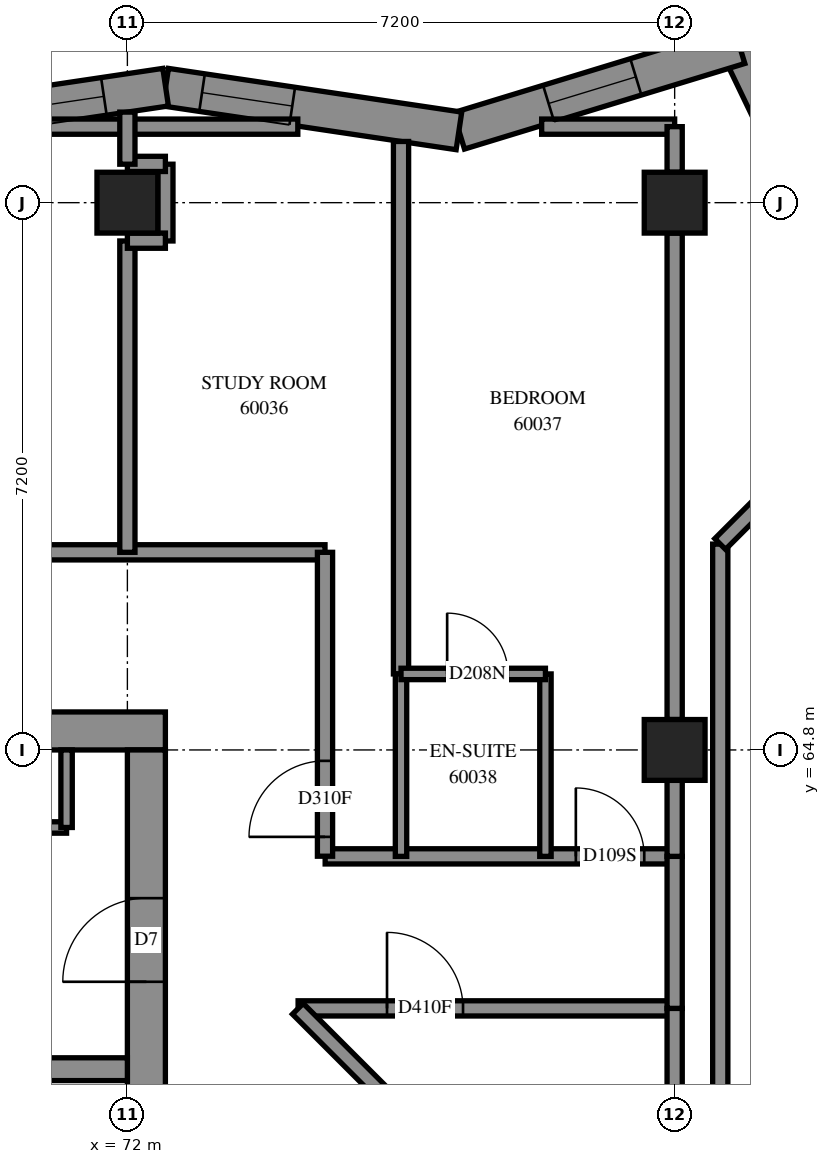
"""IFC4 building model, lengths in metres.
Left out: names, types, materials, properties, quantities, classifications, styles, units other than length and angle.
Written with IfcOpenShell. Run it as: python <this file> out.ifc"""

import sys

from ifc_helpers import new_model, si_unit, direction, frame, frame_2d, origin, origin_2d, place, context, subcontext, project, spatial, polyline, rectangle, outline, extrude, element, fill, save


model = new_model("IFC4")
c1 = context("Model", 3, precision=1e-05, world=origin(), true_north=direction((0.0, 1.0)))
c2 = subcontext(c1, "Body", "Model", "MODEL_VIEW")
j1 = project(units=[si_unit("LENGTHUNIT", "METRE"), si_unit("PLANEANGLEUNIT", "RADIAN")], contexts=[c1])
p1 = place(None, origin())
s1 = spatial("IfcSite", under=j1, at=p1, CompositionType="ELEMENT")
p2 = place(p1, origin())
s2 = spatial("IfcBuilding", under=s1, at=p2, CompositionType="ELEMENT")
p3 = place(p2, frame((0.0, 0.0, 220.2)))
s3 = spatial("IfcBuildingStorey", under=s2, at=p3, CompositionType="ELEMENT", Elevation=220.2)
for number, where, z_axis, x_axis in (
    (1, (72.0, 72.0, 0.0), (0.0, 0.0, 1.0), (1.0, 0.0, 0.0)),
    (2, (79.2, 64.8, 0.0), (0.0, 0.0, 1.0), (1.0, 0.0, 0.0)),
    (3, (79.2, 72.0, 0.0), (0.0, 0.0, 1.0), (1.0, 0.0, 0.0)),
):
    element("IfcColumn", number, at=place(p3, frame(where, z_axis=z_axis, x_axis=x_axis)), inside=s3, PredefinedType="COLUMN", context=c2, shape_type="SweptSolid", body=[
        extrude(rectangle(XDim=0.8, YDim=0.8, at=origin_2d()), origin(), (0.0, 0.0, 1.0), 3.1),
    ])
p4 = place(p3, frame((57.1, 65.05, -0.3), z_axis=(0.0, 0.0, 1.0), x_axis=(1.0, 0.0, 0.0)))
e4 = element("IfcWall", 4, at=p4, inside=s3, PredefinedType="SHEAR", context=c2, shape_type="SweptSolid", body=[
    extrude(rectangle(XDim=15.4, YDim=0.5, at=frame_2d((7.7, 0.0))), origin(), (0.0, 0.0, 1.0), 2.7),
])
p5 = place(p4, frame((10.5, 0.0, 0.3)))
e5 = element("IfcOpeningElement", 5, at=p5, cuts=e4, PredefinedType="OPENING", context=c2, shape_type="SweptSolid", body=[
    extrude(rectangle(XDim=0.8, YDim=2.1, at=frame_2d((0.4, 1.05))), frame((0.0, 0.26, 0.0), z_axis=(0.0, -1.0, 0.0), x_axis=(1.0, 0.0, 0.0)), (0.0, 0.0, 1.0), 0.52),
])
p6 = place(p3, frame((72.25, 50.4, -0.3), z_axis=(0.0, 0.0, 1.0), x_axis=(0.0, 1.0, 0.0)))
e6 = element("IfcWall", 6, at=p6, inside=s3, PredefinedType="SHEAR", context=c2, shape_type="SweptSolid", body=[
    extrude(rectangle(XDim=14.4, YDim=0.5, at=frame_2d((7.2, 0.0))), origin(), (0.0, 0.0, 1.0), 2.7),
])
p7 = place(p6, frame((4.55, 0.0, 0.3)))
e7 = element("IfcOpeningElement", 7, at=p7, cuts=e6, PredefinedType="OPENING", context=c2, shape_type="SweptSolid", body=[
    extrude(rectangle(XDim=1.1, YDim=2.1, at=frame_2d((0.55, 1.05))), frame((0.0, 0.26, 0.0), z_axis=(0.0, -1.0, 0.0), x_axis=(1.0, 0.0, 0.0)), (0.0, 0.0, 1.0), 0.52),
])
p8 = place(p6, frame((11.35, 0.0, 0.3)))
e8 = element("IfcOpeningElement", 8, at=p8, cuts=e6, PredefinedType="OPENING", context=c2, shape_type="SweptSolid", body=[
    extrude(rectangle(XDim=1.1, YDim=2.1, at=frame_2d((0.55, 1.05))), frame((0.0, 0.26, 0.0), z_axis=(0.0, -1.0, 0.0), x_axis=(1.0, 0.0, 0.0)), (0.0, 0.0, 1.0), 0.52),
])
p9 = place(p3, frame((64.8, 60.6, 0.0), z_axis=(0.0, 0.0, 1.0), x_axis=(1.0, 0.0, 0.0)))
e9 = element("IfcWall", 9, at=p9, inside=s3, PredefinedType="SOLIDWALL", context=c2, shape_type="SweptSolid", body=[
    extrude(rectangle(XDim=7.2, YDim=0.3, at=frame_2d((3.6, 0.0))), origin(), (0.0, 0.0, 1.0), 3.1),
])
p10 = place(p3, frame((81.517, 71.016, 0.0), z_axis=(0.0, 0.0, 1.0), x_axis=(-0.4329306404, 0.9014272353, 0.0)))
e10 = element("IfcWall", 10, at=p10, inside=s3, PredefinedType="SOLIDWALL", context=c2, shape_type="SweptSolid", body=[
    extrude(outline(polyline([(0.065, -0.25), (3.603, -0.25), (3.173, 0.25), (-0.065, 0.25), (0.065, -0.25)])), origin(), (0.0, 0.0, 1.0), 3.1),
])
p11 = place(p10, frame((0.737, 0.0, 0.45)))
e11 = element("IfcOpeningElement", 11, at=p11, cuts=e10, PredefinedType="OPENING", context=c2, shape_type="SweptSolid", body=[
    extrude(rectangle(XDim=1.2, YDim=2.5, at=frame_2d((0.6, 1.25))), frame((0.0, 0.26, 0.0), z_axis=(0.0, -1.0, 0.0), x_axis=(1.0, 0.0, 0.0)), (0.0, 0.0, 1.0), 0.52),
])
p12 = place(p3, frame((80.05, 74.07, 0.0), z_axis=(0.0, 0.0, 1.0), x_axis=(-0.9564370844, -0.2919385271, 0.0)))
e12 = element("IfcWall", 12, at=p12, inside=s3, PredefinedType="SOLIDWALL", context=c2, shape_type="SweptSolid", body=[
    extrude(outline(polyline([(-0.215, -0.25), (3.8, -0.25), (3.913, 0.25), (0.215, 0.25), (-0.215, -0.25)])), origin(), (0.0, 0.0, 1.0), 3.1),
])
p13 = place(p12, frame((1.423, 0.0, 0.45)))
e13 = element("IfcOpeningElement", 13, at=p13, cuts=e12, PredefinedType="OPENING", context=c2, shape_type="SweptSolid", body=[
    extrude(rectangle(XDim=1.2, YDim=2.5, at=frame_2d((0.6, 1.25))), frame((0.0, 0.26, 0.0), z_axis=(0.0, -1.0, 0.0), x_axis=(1.0, 0.0, 0.0)), (0.0, 0.0, 1.0), 0.52),
])
p14 = place(p3, frame((76.362, 72.944, 0.0), z_axis=(0.0, 0.0, 1.0), x_axis=(-0.9890858863, 0.1473401149, 0.0)))
e14 = element("IfcWall", 14, at=p14, inside=s3, PredefinedType="SOLIDWALL", context=c2, shape_type="SweptSolid", body=[
    extrude(outline(polyline([(0.056, -0.25), (3.938, -0.25), (3.864, 0.25), (-0.056, 0.25), (0.056, -0.25)])), origin(), (0.0, 0.0, 1.0), 3.1),
])
p15 = place(p14, frame((2.217, 0.0, 0.45)))
e15 = element("IfcOpeningElement", 15, at=p15, cuts=e14, PredefinedType="OPENING", context=c2, shape_type="SweptSolid", body=[
    extrude(rectangle(XDim=1.2, YDim=2.5, at=frame_2d((0.6, 1.25))), frame((0.0, 0.26, 0.0), z_axis=(0.0, -1.0, 0.0), x_axis=(1.0, 0.0, 0.0)), (0.0, 0.0, 1.0), 0.52),
])
p16 = place(p3, frame((72.503, 73.519, 0.0), z_axis=(0.0, 0.0, 1.0), x_axis=(-0.9890847468, -0.1473477641, 0.0)))
e16 = element("IfcWall", 16, at=p16, inside=s3, PredefinedType="SOLIDWALL", context=c2, shape_type="SweptSolid", body=[
    extrude(outline(polyline([(-0.037, -0.25), (3.845, -0.25), (3.919, 0.25), (0.037, 0.25), (-0.037, -0.25)])), origin(), (0.0, 0.0, 1.0), 3.1),
])
p17 = place(p16, frame((2.195, 0.0, 0.45)))
e17 = element("IfcOpeningElement", 17, at=p17, cuts=e16, PredefinedType="OPENING", context=c2, shape_type="SweptSolid", body=[
    extrude(rectangle(XDim=1.3, YDim=2.5, at=frame_2d((0.65, 1.25))), frame((0.0, 0.26, 0.0), z_axis=(0.0, -1.0, 0.0), x_axis=(1.0, 0.0, 0.0)), (0.0, 0.0, 1.0), 0.52),
])
p18 = place(p16, frame((0.822, 0.0, 0.45)))
e18 = element("IfcOpeningElement", 18, at=p18, cuts=e16, PredefinedType="OPENING", context=c2, shape_type="SweptSolid", body=[
    extrude(rectangle(XDim=0.8, YDim=2.5, at=frame_2d((0.4, 1.25))), frame((0.0, 0.26, 0.0), z_axis=(0.0, -1.0, 0.0), x_axis=(1.0, 0.0, 0.0)), (0.0, 0.0, 1.0), 0.52),
])
p19 = place(p3, frame((64.95, 63.78, 0.0), z_axis=(0.0, 0.0, 1.0), x_axis=(1.0, 0.0, 0.0)))
e19 = element("IfcWall", 19, at=p19, inside=s3, PredefinedType="PARTITIONING", context=c2, shape_type="SweptSolid", body=[
    extrude(rectangle(XDim=6.25, YDim=0.15, at=frame_2d((3.125, 0.0))), origin(), (0.0, 0.0, 1.0), 3.1),
])
p20 = place(p3, frame((71.2, 63.78, 0.0), z_axis=(0.0, 0.0, 1.0), x_axis=(0.0, 1.0, 0.0)))
e20 = element("IfcWall", 20, at=p20, inside=s3, PredefinedType="PARTITIONING", context=c2, shape_type="SweptSolid", body=[
    extrude(rectangle(XDim=1.02, YDim=0.15, at=frame_2d((0.51, 0.0))), origin(), (0.0, 0.0, 1.0), 3.1),
])
p21 = place(p3, frame((55.0, 67.4, 0.0), z_axis=(0.0, 0.0, 1.0), x_axis=(1.0, 0.0, 0.0)))
e21 = element("IfcWall", 21, at=p21, inside=s3, PredefinedType="PARTITIONING", context=c2, shape_type="SweptSolid", body=[
    extrude(rectangle(XDim=19.6, YDim=0.2, at=frame_2d((9.8, 0.0))), origin(), (0.0, 0.0, 1.0), 3.1),
])
p22 = place(p21, frame((4.9, 0.0, 0.0)))
e22 = element("IfcOpeningElement", 22, at=p22, cuts=e21, PredefinedType="OPENING", context=c2, shape_type="SweptSolid", body=[
    extrude(rectangle(XDim=0.9, YDim=2.1, at=frame_2d((0.45, 1.05))), frame((0.0, 0.11, 0.0), z_axis=(0.0, -1.0, 0.0), x_axis=(1.0, 0.0, 0.0)), (0.0, 0.0, 1.0), 0.22),
])
p23 = place(p21, frame((6.6, 0.0, 0.0)))
e23 = element("IfcOpeningElement", 23, at=p23, cuts=e21, PredefinedType="OPENING", context=c2, shape_type="SweptSolid", body=[
    extrude(rectangle(XDim=0.9, YDim=2.1, at=frame_2d((0.45, 1.05))), frame((0.0, 0.11, 0.0), z_axis=(0.0, -1.0, 0.0), x_axis=(1.0, 0.0, 0.0)), (0.0, 0.0, 1.0), 0.22),
])
p24 = place(p21, frame((14.001, 0.0, 0.0)))
e24 = element("IfcOpeningElement", 24, at=p24, cuts=e21, PredefinedType="OPENING", context=c2, shape_type="SweptSolid", body=[
    extrude(rectangle(XDim=0.9, YDim=2.1, at=frame_2d((0.45, 1.05))), frame((0.0, 0.11, 0.0), z_axis=(0.0, -1.0, 0.0), x_axis=(1.0, 0.0, 0.0)), (0.0, 0.0, 1.0), 0.22),
])
p25 = place(p3, frame((79.8, 55.912, 0.0), z_axis=(0.0, 0.0, 1.0), x_axis=(0.0, 1.0, 0.0)))
e25 = element("IfcWall", 25, at=p25, inside=s3, PredefinedType="PARTITIONING", context=c2, shape_type="SweptSolid", body=[
    extrude(rectangle(XDim=11.596, YDim=0.2, at=frame_2d((5.798, 0.0))), origin(), (0.0, 0.0, 1.0), 3.1),
])
p26 = place(p3, frame((79.799, 55.913, 0.0), z_axis=(0.0, 0.0, 1.0), x_axis=(0.7071067812, 0.7071067812, 0.0)))
e26 = element("IfcWall", 26, at=p26, inside=s3, PredefinedType="PARTITIONING", context=c2, shape_type="SweptSolid", body=[
    extrude(rectangle(XDim=9.95, YDim=0.2, at=frame_2d((4.975, 0.0))), origin(), (0.0, 0.0, 1.0), 3.1),
])
p27 = place(p26, frame((0.927, 0.0, 0.0)))
e27 = element("IfcOpeningElement", 27, at=p27, cuts=e26, PredefinedType="OPENING", context=c2, shape_type="SweptSolid", body=[
    extrude(rectangle(XDim=1.0, YDim=2.1, at=frame_2d((0.5, 1.05))), frame((0.0, 0.11, 0.0), z_axis=(0.0, -1.0, 0.0), x_axis=(1.0, 0.0, 0.0)), (0.0, 0.0, 1.0), 0.22),
])
p28 = place(p3, frame((75.6, 65.8, 0.0), z_axis=(0.0, 0.0, 1.0), x_axis=(0.0, 1.0, 0.0)))
e28 = element("IfcWall", 28, at=p28, inside=s3, PredefinedType="PARTITIONING", context=c2, shape_type="SweptSolid", body=[
    extrude(rectangle(XDim=7.005, YDim=0.2, at=frame_2d((3.503, 0.0))), origin(), (0.0, 0.0, 1.0), 3.1),
])
p29 = place(p3, frame((79.2, 65.2, 0.0), z_axis=(0.0, 0.0, 1.0), x_axis=(0.0, 1.0, 0.0)))
e29 = element("IfcWall", 29, at=p29, inside=s3, PredefinedType="PARTITIONING", context=c2, shape_type="SweptSolid", body=[
    extrude(rectangle(XDim=6.4, YDim=0.2, at=frame_2d((3.2, 0.0))), origin(), (0.0, 0.0, 1.0), 3.1),
])
p30 = place(p3, frame((74.246, 61.4, 0.0), z_axis=(0.0, 0.0, 1.0), x_axis=(1.0, 0.0, 0.0)))
e30 = element("IfcWall", 30, at=p30, inside=s3, PredefinedType="PARTITIONING", context=c2, shape_type="SweptSolid", body=[
    extrude(rectangle(XDim=4.954, YDim=0.2, at=frame_2d((2.477, 0.0))), origin(), (0.0, 0.0, 1.0), 3.1),
])
p31 = place(p30, frame((1.17, 0.0, 0.0)))
e31 = element("IfcOpeningElement", 31, at=p31, cuts=e30, PredefinedType="OPENING", context=c2, shape_type="SweptSolid", body=[
    extrude(rectangle(XDim=1.0, YDim=2.1, at=frame_2d((0.5, 1.05))), frame((0.0, 0.11, 0.0), z_axis=(0.0, -1.0, 0.0), x_axis=(1.0, 0.0, 0.0)), (0.0, 0.0, 1.0), 0.22),
])
p32 = place(p3, frame((74.602, 63.4, 0.0), z_axis=(0.0, 0.0, 1.0), x_axis=(1.0, 0.0, 0.0)))
e32 = element("IfcWall", 32, at=p32, inside=s3, PredefinedType="PARTITIONING", context=c2, shape_type="SweptSolid", body=[
    extrude(rectangle(XDim=4.598, YDim=0.2, at=frame_2d((2.299, 0.0))), origin(), (0.0, 0.0, 1.0), 3.1),
])
p33 = place(p32, frame((3.298, 0.0, 0.0)))
e33 = element("IfcOpeningElement", 33, at=p33, cuts=e32, PredefinedType="OPENING", context=c2, shape_type="SweptSolid", body=[
    extrude(rectangle(XDim=0.9, YDim=2.1, at=frame_2d((0.45, 1.05))), frame((0.0, 0.11, 0.0), z_axis=(0.0, -1.0, 0.0), x_axis=(1.0, 0.0, 0.0)), (0.0, 0.0, 1.0), 0.22),
])
p34 = place(p3, frame((72.0, 67.4, 0.0), z_axis=(0.0, 0.0, 1.0), x_axis=(0.0, 1.0, 0.0)))
e34 = element("IfcWall", 34, at=p34, inside=s3, PredefinedType="PARTITIONING", context=c2, shape_type="SweptSolid", body=[
    extrude(rectangle(XDim=4.096, YDim=0.2, at=frame_2d((2.048, 0.0))), origin(), (0.0, 0.0, 1.0), 3.1),
])
p35 = place(p3, frame((74.6, 63.402, 0.0), z_axis=(0.0, 0.0, 1.0), x_axis=(0.0, 1.0, 0.0)))
e35 = element("IfcWall", 35, at=p35, inside=s3, PredefinedType="PARTITIONING", context=c2, shape_type="SweptSolid", body=[
    extrude(rectangle(XDim=3.998, YDim=0.2, at=frame_2d((1.999, 0.0))), origin(), (0.0, 0.0, 1.0), 3.1),
])
p36 = place(p35, frame((0.255, 0.0, 0.0)))
e36 = element("IfcOpeningElement", 36, at=p36, cuts=e35, PredefinedType="OPENING", context=c2, shape_type="SweptSolid", body=[
    extrude(rectangle(XDim=1.0, YDim=2.1, at=frame_2d((0.5, 1.05))), frame((0.0, 0.11, 0.0), z_axis=(0.0, -1.0, 0.0), x_axis=(1.0, 0.0, 0.0)), (0.0, 0.0, 1.0), 0.22),
])
p37 = place(p3, frame((79.799, 67.509, 0.0), z_axis=(0.0, 0.0, 1.0), x_axis=(0.7070931116, 0.7071204505, 0.0)))
e37 = element("IfcWall", 37, at=p37, inside=s3, PredefinedType="PARTITIONING", context=c2, shape_type="SweptSolid", body=[
    extrude(rectangle(XDim=3.658, YDim=0.2, at=frame_2d((1.829, 0.0))), origin(), (0.0, 0.0, 1.0), 3.1),
])
p38 = place(p3, frame((70.764, 73.0, 0.0), z_axis=(0.0, 0.0, 1.0), x_axis=(1.0, 0.0, 0.0)))
e38 = element("IfcWall", 38, at=p38, inside=s3, PredefinedType="PARTITIONING", context=c2, shape_type="SweptSolid", body=[
    extrude(rectangle(XDim=3.478, YDim=0.2, at=frame_2d((1.739, 0.0))), origin(), (0.0, 0.0, 1.0), 3.1),
])
p39 = place(p3, frame((79.2, 58.0, 0.0), z_axis=(0.0, 0.0, 1.0), x_axis=(0.0, 1.0, 0.0)))
e39 = element("IfcWall", 39, at=p39, inside=s3, PredefinedType="PARTITIONING", context=c2, shape_type="SweptSolid", body=[
    extrude(rectangle(XDim=3.4, YDim=0.2, at=frame_2d((1.7, 0.0))), origin(), (0.0, 0.0, 1.0), 3.1),
])
for number, where, z_axis, x_axis in (
    (40, (75.6, 63.4, 0.0), (0.0, 0.0, 1.0), (0.0, 1.0, 0.0)),
    (41, (77.5, 63.4, 0.0), (0.0, 0.0, 1.0), (0.0, 1.0, 0.0)),
):
    element("IfcWall", number, at=place(p3, frame(where, z_axis=z_axis, x_axis=x_axis)), inside=s3, PredefinedType="PARTITIONING", context=c2, shape_type="SweptSolid", body=[
        extrude(rectangle(XDim=2.4, YDim=0.15, at=frame_2d((1.2, 0.0))), origin(), (0.0, 0.0, 1.0), 3.1),
    ])
p40 = place(p3, frame((79.2, 61.4, 0.0), z_axis=(0.0, 0.0, 1.0), x_axis=(0.0, 1.0, 0.0)))
e42 = element("IfcWall", 42, at=p40, inside=s3, PredefinedType="PARTITIONING", context=c2, shape_type="SweptSolid", body=[
    extrude(rectangle(XDim=2.0, YDim=0.2, at=frame_2d((1.0, 0.0))), origin(), (0.0, 0.0, 1.0), 3.1),
])
p41 = place(p3, frame((74.243, 61.395, 0.0), z_axis=(0.0, 0.0, 1.0), x_axis=(0.7071067812, -0.7071067812, 0.0)))
e43 = element("IfcWall", 43, at=p41, inside=s3, PredefinedType="PARTITIONING", context=c2, shape_type="SweptSolid", body=[
    extrude(rectangle(XDim=1.915, YDim=0.2, at=frame_2d((0.957, 0.0))), origin(), (0.0, 0.0, 1.0), 3.1),
])
p42 = place(p3, frame((75.6, 65.8, 0.0), z_axis=(0.0, 0.0, 1.0), x_axis=(1.0, 0.0, 0.0)))
e44 = element("IfcWall", 44, at=p42, inside=s3, PredefinedType="PARTITIONING", context=c2, shape_type="SweptSolid", body=[
    extrude(rectangle(XDim=1.9, YDim=0.15, at=frame_2d((0.95, 0.0))), origin(), (0.0, 0.0, 1.0), 3.1),
])
p43 = place(p42, frame((0.607, 0.0, 0.0)))
e45 = element("IfcOpeningElement", 45, at=p43, cuts=e44, PredefinedType="OPENING", context=c2, shape_type="SweptSolid", body=[
    extrude(rectangle(XDim=0.8, YDim=2.1, at=frame_2d((0.4, 1.05))), frame((0.0, 0.085, 0.0), z_axis=(0.0, -1.0, 0.0), x_axis=(1.0, 0.0, 0.0)), (0.0, 0.0, 1.0), 0.17),
])
p44 = place(p3, frame((77.45, 73.0, 0.0), z_axis=(0.0, 0.0, 1.0), x_axis=(1.0, 0.0, 0.0)))
e46 = element("IfcWall", 46, at=p44, inside=s3, PredefinedType="PARTITIONING", context=c2, shape_type="SweptSolid", body=[
    extrude(rectangle(XDim=1.75, YDim=0.2, at=frame_2d((0.875, 0.0))), origin(), (0.0, 0.0, 1.0), 3.1),
])
p45 = place(p3, frame((72.5, 71.496, 0.0), z_axis=(0.0, 0.0, 1.0), x_axis=(0.0, 1.0, 0.0)))
e47 = element("IfcWall", 47, at=p45, inside=s3, PredefinedType="PARTITIONING", context=c2, shape_type="SweptSolid", body=[
    extrude(rectangle(XDim=1.01, YDim=0.2, at=frame_2d((0.505, 0.0))), origin(), (0.0, 0.0, 1.0), 3.1),
])
p46 = place(p3, frame((79.2, 63.4, 0.0), z_axis=(0.0, 0.0, 1.0), x_axis=(0.0, 1.0, 0.0)))
e48 = element("IfcWall", 48, at=p46, inside=s3, PredefinedType="PARTITIONING", context=c2, shape_type="SweptSolid", body=[
    extrude(rectangle(XDim=1.0, YDim=0.2, at=frame_2d((0.5, 0.0))), origin(), (0.0, 0.0, 1.0), 3.1),
])
p47 = place(p3, frame((79.2, 72.4, 0.0), z_axis=(0.0, 0.0, 1.0), x_axis=(0.0, 1.0, 0.0)))
e49 = element("IfcWall", 49, at=p47, inside=s3, PredefinedType="PARTITIONING", context=c2, shape_type="SweptSolid", body=[
    extrude(rectangle(XDim=0.6, YDim=0.2, at=frame_2d((0.3, 0.0))), origin(), (0.0, 0.0, 1.0), 3.1),
])
for number, where, z_axis, x_axis in (
    (50, (72.0, 71.5, 0.0), (0.0, 0.0, 1.0), (1.0, 0.0, 0.0)),
    (51, (72.0, 72.51, 0.0), (0.0, 0.0, 1.0), (1.0, 0.0, 0.0)),
):
    element("IfcWall", number, at=place(p3, frame(where, z_axis=z_axis, x_axis=x_axis)), inside=s3, PredefinedType="PARTITIONING", context=c2, shape_type="SweptSolid", body=[
        extrude(rectangle(XDim=0.5, YDim=0.2, at=frame_2d((0.25, 0.0))), origin(), (0.0, 0.0, 1.0), 3.1),
    ])
p48 = place(p3, frame((72.0, 72.506, 0.0), z_axis=(0.0, 0.0, 1.0), x_axis=(0.0, 1.0, 0.0)))
e52 = element("IfcWall", 52, at=p48, inside=s3, PredefinedType="PARTITIONING", context=c2, shape_type="SweptSolid", body=[
    extrude(rectangle(XDim=0.685, YDim=0.2, at=frame_2d((0.343, 0.0))), origin(), (0.0, 0.0, 1.0), 3.1),
])
p49 = place(p13, origin())
e53 = element("IfcWindow", 53, at=p49, inside=s3, PartitioningType="SINGLE_PANEL", PredefinedType="WINDOW", context=c2, shape_type="SweptSolid", body=[
    extrude(rectangle(XDim=1.2, YDim=2.5, at=frame_2d((0.6, 1.25))), frame((0.0, 0.18, 0.0), z_axis=(0.0, -1.0, 0.0), x_axis=(1.0, 0.0, 0.0)), (0.0, 0.0, 1.0), 0.06),
])
fill(e13, e53)
p50 = place(p15, origin())
e54 = element("IfcWindow", 54, at=p50, inside=s3, PartitioningType="SINGLE_PANEL", PredefinedType="WINDOW", context=c2, shape_type="SweptSolid", body=[
    extrude(rectangle(XDim=1.2, YDim=2.5, at=frame_2d((0.6, 1.25))), frame((0.0, 0.14, 0.0), z_axis=(0.0, -1.0, 0.0), x_axis=(1.0, 0.0, 0.0)), (0.0, 0.0, 1.0), 0.06),
])
fill(e15, e54)
p51 = place(p8, origin())
e55 = element("IfcDoor", 55, at=p51, inside=s3, OperationType="SINGLE_SWING_RIGHT", PredefinedType="DOOR", context=c2, shape_type="SweptSolid", body=[
    extrude(rectangle(XDim=1.1, YDim=2.1, at=frame_2d((0.55, 1.05))), frame((0.0, 0.025, 0.0), z_axis=(0.0, -1.0, 0.0), x_axis=(1.0, 0.0, 0.0)), (0.0, 0.0, 1.0), 0.05),
])
fill(e8, e55)
p52 = place(p36, origin())
e56 = element("IfcDoor", 56, at=p52, inside=s3, OperationType="SINGLE_SWING_RIGHT", PredefinedType="DOOR", context=c2, shape_type="SweptSolid", body=[
    extrude(rectangle(XDim=1.0, YDim=2.1, at=frame_2d((0.5, 1.05))), frame((0.0, 0.025, 0.0), z_axis=(0.0, -1.0, 0.0), x_axis=(1.0, 0.0, 0.0)), (0.0, 0.0, 1.0), 0.05),
])
fill(e36, e56)
p53 = place(p33, origin())
e57 = element("IfcDoor", 57, at=p53, inside=s3, OperationType="SINGLE_SWING_LEFT", PredefinedType="DOOR", context=c2, shape_type="SweptSolid", body=[
    extrude(rectangle(XDim=0.9, YDim=2.1, at=frame_2d((0.45, 1.05))), frame((0.0, 0.025, 0.0), z_axis=(0.0, -1.0, 0.0), x_axis=(1.0, 0.0, 0.0)), (0.0, 0.0, 1.0), 0.05),
])
fill(e33, e57)
p54 = place(p43, origin())
e58 = element("IfcDoor", 58, at=p54, inside=s3, OperationType="SINGLE_SWING_RIGHT", PredefinedType="DOOR", context=c2, shape_type="SweptSolid", body=[
    extrude(rectangle(XDim=0.8, YDim=2.1, at=frame_2d((0.4, 1.05))), frame((0.0, 0.025, 0.0), z_axis=(0.0, -1.0, 0.0), x_axis=(1.0, 0.0, 0.0)), (0.0, 0.0, 1.0), 0.05),
])
fill(e45, e58)
p55 = place(p31, origin())
e59 = element("IfcDoor", 59, at=p55, inside=s3, OperationType="SINGLE_SWING_RIGHT", PredefinedType="DOOR", context=c2, shape_type="SweptSolid", body=[
    extrude(rectangle(XDim=1.0, YDim=2.1, at=frame_2d((0.5, 1.05))), frame((0.0, 0.025, 0.0), z_axis=(0.0, -1.0, 0.0), x_axis=(1.0, 0.0, 0.0)), (0.0, 0.0, 1.0), 0.05),
])
fill(e31, e59)
p56 = place(p18, origin())
e60 = element("IfcWindow", 60, at=p56, inside=s3, PartitioningType="SINGLE_PANEL", PredefinedType="WINDOW", context=c2, shape_type="SweptSolid", body=[
    extrude(rectangle(XDim=0.8, YDim=2.5, at=frame_2d((0.4, 1.25))), frame((0.0, 0.12, 0.0), z_axis=(0.0, -1.0, 0.0), x_axis=(1.0, 0.0, 0.0)), (0.0, 0.0, 1.0), 0.06),
])
fill(e18, e60)
save(model, sys.argv[1])
